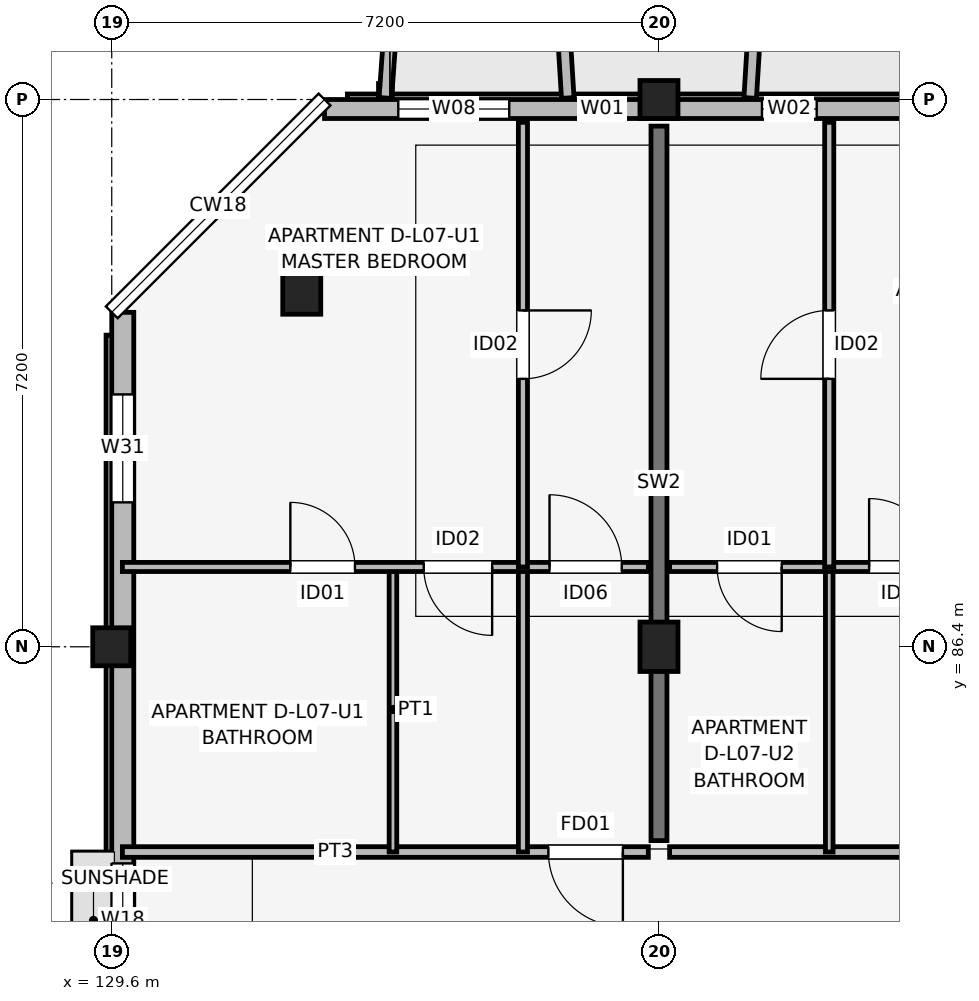
"""IFC4 building model, lengths in metres.
Left out: names, types, materials, properties, quantities, classifications, styles, units other than length and angle.
Written with IfcOpenShell. Run it as: python <this file> out.ifc"""

import sys

from ifc_helpers import new_model, si_unit, direction, frame, frame_2d, origin, origin_2d, place, context, subcontext, project, spatial, rectangle, extrude, element, fill, save


model = new_model("IFC4")
c1 = context("Model", 3, precision=1e-05, world=origin(), true_north=direction((0.0, 1.0)))
c2 = subcontext(c1, "Body", "Model", "MODEL_VIEW")
j1 = project(units=[si_unit("LENGTHUNIT", "METRE"), si_unit("PLANEANGLEUNIT", "RADIAN")], contexts=[c1])
p1 = place(None, origin())
s1 = spatial("IfcSite", under=j1, at=p1, CompositionType="ELEMENT")
p2 = place(p1, origin())
s2 = spatial("IfcBuilding", under=s1, at=p2, CompositionType="ELEMENT")
p3 = place(p2, frame((0.0, 0.0, 24.45)))
s3 = spatial("IfcBuildingStorey", under=s2, at=p3, CompositionType="ELEMENT", Elevation=24.45)
p4 = place(p3, frame((129.6, 86.4, 0.0), z_axis=(0.0, 0.0, 1.0), x_axis=(1.0, 0.0, 0.0)))
e1 = element("IfcColumn", 1, at=p4, inside=s3, PredefinedType="COLUMN", context=c2, shape_type="SweptSolid", body=[
    extrude(rectangle(XDim=0.5, YDim=0.5, at=origin_2d()), origin(), (0.0, 0.0, 1.0), 3.15),
])
for number, where, z_axis, x_axis in (
    (2, (132.1, 91.1, 0.0), (0.0, 0.0, 1.0), (1.0, 0.0, 0.0)),
    (3, (136.8, 86.4, 0.0), (0.0, 0.0, 1.0), (1.0, 0.0, 0.0)),
):
    element("IfcColumn", number, at=place(p3, frame(where, z_axis=z_axis, x_axis=x_axis)), inside=s3, PredefinedType="COLUMN", context=c2, shape_type="SweptSolid", body=[
        extrude(rectangle(XDim=0.5, YDim=0.65, at=origin_2d()), origin(), (0.0, 0.0, 1.0), 3.15),
    ])
p5 = place(p3, frame((136.8, 93.6, 0.0), z_axis=(0.0, 0.0, 1.0), x_axis=(1.0, 0.0, 0.0)))
e4 = element("IfcColumn", 4, at=p5, inside=s3, PredefinedType="COLUMN", context=c2, shape_type="SweptSolid", body=[
    extrude(rectangle(XDim=0.5, YDim=0.5, at=origin_2d()), origin(), (0.0, 0.0, 1.0), 3.15),
])
p6 = place(p3, frame((136.8, 83.85, 0.0), z_axis=(0.0, 0.0, 1.0), x_axis=(0.0, 1.0, 0.0)))
e5 = element("IfcWall", 5, at=p6, inside=s3, PredefinedType="SHEAR", context=c2, shape_type="SweptSolid", body=[
    extrude(rectangle(XDim=9.4, YDim=0.21, at=frame_2d((4.7, 0.0))), origin(), (0.0, 0.0, 1.0), 3.15),
])
p7 = place(p3, frame((162.8, 93.475, 0.0), z_axis=(0.0, 0.0, 1.0), x_axis=(-1.0, 0.0, 0.0)))
e6 = element("IfcWall", 6, at=p7, inside=s3, PredefinedType="SOLIDWALL", context=c2, shape_type="SweptSolid", body=[
    extrude(rectangle(XDim=30.4, YDim=0.25, at=frame_2d((15.2, 0.0))), origin(), (0.0, 0.0, 1.0), 2.43),
])
p8 = place(p7, frame((21.95, 0.0, 0.0), z_axis=(0.0, 0.0, 1.0), x_axis=(-1.0, 0.0, 0.0)))
e7 = element("IfcOpeningElement", 7, at=p8, cuts=e6, PredefinedType="OPENING", context=c2, shape_type="SweptSolid", body=[
    extrude(rectangle(XDim=1.5, YDim=2.15, at=frame_2d((0.75, 1.075))), frame((0.0, 0.135, 0.0), z_axis=(0.0, -1.0, 0.0), x_axis=(1.0, 0.0, 0.0)), (0.0, 0.0, 1.0), 0.27),
])
p9 = place(p7, frame((7.7, 0.0, 0.0), z_axis=(0.0, 0.0, 1.0), x_axis=(-1.0, 0.0, 0.0)))
e8 = element("IfcOpeningElement", 8, at=p9, cuts=e6, PredefinedType="OPENING", context=c2, shape_type="SweptSolid", body=[
    extrude(rectangle(XDim=1.8, YDim=2.15, at=frame_2d((0.9, 1.075))), frame((0.0, 0.135, 0.0), z_axis=(0.0, -1.0, 0.0), x_axis=(1.0, 0.0, 0.0)), (0.0, 0.0, 1.0), 0.27),
])
p10 = place(p7, frame((27.97, 0.0, 0.7)))
e9 = element("IfcOpeningElement", 9, at=p10, cuts=e6, PredefinedType="OPENING", context=c2, shape_type="SweptSolid", body=[
    extrude(rectangle(XDim=1.46, YDim=1.55, at=frame_2d((0.73, 0.775))), frame((0.0, 0.135, 0.0), z_axis=(0.0, -1.0, 0.0), x_axis=(1.0, 0.0, 0.0)), (0.0, 0.0, 1.0), 0.27),
])
p11 = place(p7, frame((26.445, 0.0, 0.75)))
e10 = element("IfcOpeningElement", 10, at=p11, cuts=e6, PredefinedType="OPENING", context=c2, shape_type="SweptSolid", body=[
    extrude(rectangle(XDim=0.6, YDim=1.25, at=frame_2d((0.3, 0.625))), frame((0.0, 0.135, 0.0), z_axis=(0.0, -1.0, 0.0), x_axis=(1.0, 0.0, 0.0)), (0.0, 0.0, 1.0), 0.27),
])
p12 = place(p7, frame((23.925, 0.0, 0.75)))
e11 = element("IfcOpeningElement", 11, at=p12, cuts=e6, PredefinedType="OPENING", context=c2, shape_type="SweptSolid", body=[
    extrude(rectangle(XDim=0.72, YDim=1.35, at=frame_2d((0.36, 0.675))), frame((0.0, 0.135, 0.0), z_axis=(0.0, -1.0, 0.0), x_axis=(1.0, 0.0, 0.0)), (0.0, 0.0, 1.0), 0.27),
])
p13 = place(p7, frame((16.725, 0.0, 0.75)))
e12 = element("IfcOpeningElement", 12, at=p13, cuts=e6, PredefinedType="OPENING", context=c2, shape_type="SweptSolid", body=[
    extrude(rectangle(XDim=0.72, YDim=1.35, at=frame_2d((0.36, 0.675))), frame((0.0, 0.135, 0.0), z_axis=(0.0, -1.0, 0.0), x_axis=(1.0, 0.0, 0.0)), (0.0, 0.0, 1.0), 0.27),
])
p14 = place(p7, frame((12.925, 0.0, 0.67)))
e13 = element("IfcOpeningElement", 13, at=p14, cuts=e6, PredefinedType="OPENING", context=c2, shape_type="SweptSolid", body=[
    extrude(rectangle(XDim=2.15, YDim=1.65, at=frame_2d((1.075, 0.825))), frame((0.0, 0.135, 0.0), z_axis=(0.0, -1.0, 0.0), x_axis=(1.0, 0.0, 0.0)), (0.0, 0.0, 1.0), 0.27),
])
p15 = place(p7, frame((3.355, 0.0, 0.75)))
e14 = element("IfcOpeningElement", 14, at=p15, cuts=e6, PredefinedType="OPENING", context=c2, shape_type="SweptSolid", body=[
    extrude(rectangle(XDim=0.6, YDim=1.25, at=frame_2d((0.3, 0.625))), frame((0.0, 0.135, 0.0), z_axis=(0.0, -1.0, 0.0), x_axis=(1.0, 0.0, 0.0)), (0.0, 0.0, 1.0), 0.27),
])
p16 = place(p7, frame((0.96, 0.0, 0.75)))
e15 = element("IfcOpeningElement", 15, at=p16, cuts=e6, PredefinedType="OPENING", context=c2, shape_type="SweptSolid", body=[
    extrude(rectangle(XDim=1.22, YDim=1.5, at=frame_2d((0.61, 0.75))), frame((0.0, 0.135, 0.0), z_axis=(0.0, -1.0, 0.0), x_axis=(1.0, 0.0, 0.0)), (0.0, 0.0, 1.0), 0.27),
])
p17 = place(p3, frame((129.745, 90.8, 0.0), z_axis=(0.0, 0.0, 1.0), x_axis=(0.0, -1.0, 0.0)))
e16 = element("IfcWall", 16, at=p17, inside=s3, PredefinedType="SOLIDWALL", context=c2, shape_type="SweptSolid", body=[
    extrude(rectangle(XDim=16.0, YDim=0.29, at=frame_2d((8.0, 0.0))), origin(), (0.0, 0.0, 1.0), 2.43),
])
p18 = place(p17, frame((7.25, 0.0, 1.05)))
e17 = element("IfcOpeningElement", 17, at=p18, cuts=e16, PredefinedType="OPENING", context=c2, shape_type="SweptSolid", body=[
    extrude(rectangle(XDim=1.5, YDim=1.15, at=frame_2d((0.75, 0.575))), frame((0.0, 0.155, 0.0), z_axis=(0.0, -1.0, 0.0), x_axis=(1.0, 0.0, 0.0)), (0.0, 0.0, 1.0), 0.31),
])
p19 = place(p17, frame((1.08, 0.0, 0.72)))
e18 = element("IfcOpeningElement", 18, at=p19, cuts=e16, PredefinedType="OPENING", context=c2, shape_type="SweptSolid", body=[
    extrude(rectangle(XDim=1.42, YDim=1.6, at=frame_2d((0.71, 0.8))), frame((0.0, 0.155, 0.0), z_axis=(0.0, -1.0, 0.0), x_axis=(1.0, 0.0, 0.0)), (0.0, 0.0, 1.0), 0.31),
])
p20 = place(p3, frame((133.2, 93.62, 0.0), z_axis=(0.0, 0.0, 1.0), x_axis=(0.071317687608, 0.997453651772, 0.0)))
e19 = element("IfcWall", 19, at=p20, inside=s3, PredefinedType="ELEMENTEDWALL", context=c2, shape_type="SweptSolid", body=[
    extrude(rectangle(XDim=1.965, YDim=0.165, at=frame_2d((0.982, 0.0))), origin(), (0.0, 0.0, 1.0), 2.95),
])
p21 = place(p3, frame((135.6, 93.62, 0.0), z_axis=(0.0, 0.0, 1.0), x_axis=(-0.061170732449, 0.998127317276, 0.0)))
e20 = element("IfcWall", 20, at=p21, inside=s3, PredefinedType="ELEMENTEDWALL", context=c2, shape_type="SweptSolid", body=[
    extrude(rectangle(XDim=1.964, YDim=0.165, at=frame_2d((0.982, 0.0))), origin(), (0.0, 0.0, 1.0), 2.95),
])
p22 = place(p3, frame((138.0, 93.62, 0.0), z_axis=(0.0, 0.0, 1.0), x_axis=(0.061170732449, 0.998127317276, 0.0)))
e21 = element("IfcWall", 21, at=p22, inside=s3, PredefinedType="ELEMENTEDWALL", context=c2, shape_type="SweptSolid", body=[
    extrude(rectangle(XDim=1.964, YDim=0.165, at=frame_2d((0.982, 0.0))), origin(), (0.0, 0.0, 1.0), 2.45),
])
p23 = place(p3, frame((129.74, 83.7, 0.0), z_axis=(0.0, 0.0, 1.0), x_axis=(1.0, 0.0, 0.0)))
e22 = element("IfcWall", 22, at=p23, inside=s3, PredefinedType="PARTITIONING", context=c2, shape_type="SweptSolid", body=[
    extrude(rectangle(XDim=6.92, YDim=0.14, at=frame_2d((3.46, 0.0))), origin(), (0.0, 0.0, 1.0), 2.38),
])
p24 = place(p23, frame((6.585, 0.0, 0.0), z_axis=(0.0, 0.0, 1.0), x_axis=(-1.0, 0.0, 0.0)))
e23 = element("IfcOpeningElement", 23, at=p24, cuts=e22, PredefinedType="OPENING", context=c2, shape_type="SweptSolid", body=[
    extrude(rectangle(XDim=0.98, YDim=2.1, at=frame_2d((0.49, 1.05))), frame((0.0, 0.08, 0.0), z_axis=(0.0, -1.0, 0.0), x_axis=(1.0, 0.0, 0.0)), (0.0, 0.0, 1.0), 0.16),
])
p25 = place(p3, frame((133.3, 83.7, 0.0), z_axis=(0.0, 0.0, 1.0), x_axis=(0.0, 1.0, 0.0)))
e24 = element("IfcWall", 24, at=p25, inside=s3, PredefinedType="PARTITIONING", context=c2, shape_type="SweptSolid", body=[
    extrude(rectangle(XDim=3.75, YDim=0.1, at=frame_2d((1.875, 0.0))), origin(), (0.0, 0.0, 1.0), 2.38),
])
p26 = place(p3, frame((135.01, 83.7, 0.0), z_axis=(0.0, 0.0, 1.0), x_axis=(0.0, 1.0, 0.0)))
e25 = element("IfcWall", 25, at=p26, inside=s3, PredefinedType="PARTITIONING", context=c2, shape_type="SweptSolid", body=[
    extrude(rectangle(XDim=3.75, YDim=0.12, at=frame_2d((1.875, 0.0))), origin(), (0.0, 0.0, 1.0), 2.38),
])
p27 = place(p3, frame((129.74, 87.45, 0.0), z_axis=(0.0, 0.0, 1.0), x_axis=(1.0, 0.0, 0.0)))
e26 = element("IfcWall", 26, at=p27, inside=s3, PredefinedType="PARTITIONING", context=c2, shape_type="SweptSolid", body=[
    extrude(rectangle(XDim=6.92, YDim=0.12, at=frame_2d((3.46, 0.0))), origin(), (0.0, 0.0, 1.0), 2.38),
])
p28 = place(p27, frame((2.21, 0.0, 0.0)))
e27 = element("IfcOpeningElement", 27, at=p28, cuts=e26, PredefinedType="OPENING", context=c2, shape_type="SweptSolid", body=[
    extrude(rectangle(XDim=0.85, YDim=2.08, at=frame_2d((0.425, 1.04))), frame((0.0, 0.07, 0.0), z_axis=(0.0, -1.0, 0.0), x_axis=(1.0, 0.0, 0.0)), (0.0, 0.0, 1.0), 0.14),
])
p29 = place(p27, frame((4.865, 0.0, 0.0), z_axis=(0.0, 0.0, 1.0), x_axis=(-1.0, 0.0, 0.0)))
e28 = element("IfcOpeningElement", 28, at=p29, cuts=e26, PredefinedType="OPENING", context=c2, shape_type="SweptSolid", body=[
    extrude(rectangle(XDim=0.9, YDim=2.08, at=frame_2d((0.45, 1.04))), frame((0.0, 0.07, 0.0), z_axis=(0.0, -1.0, 0.0), x_axis=(1.0, 0.0, 0.0)), (0.0, 0.0, 1.0), 0.14),
])
p30 = place(p27, frame((5.62, 0.0, 0.0)))
e29 = element("IfcOpeningElement", 29, at=p30, cuts=e26, PredefinedType="OPENING", context=c2, shape_type="SweptSolid", body=[
    extrude(rectangle(XDim=0.95, YDim=2.08, at=frame_2d((0.475, 1.04))), frame((0.0, 0.07, 0.0), z_axis=(0.0, -1.0, 0.0), x_axis=(1.0, 0.0, 0.0)), (0.0, 0.0, 1.0), 0.14),
])
p31 = place(p3, frame((135.01, 87.45, 0.0), z_axis=(0.0, 0.0, 1.0), x_axis=(0.0, 1.0, 0.0)))
e30 = element("IfcWall", 30, at=p31, inside=s3, PredefinedType="PARTITIONING", context=c2, shape_type="SweptSolid", body=[
    extrude(rectangle(XDim=5.85, YDim=0.12, at=frame_2d((2.925, 0.0))), origin(), (0.0, 0.0, 1.0), 2.38),
])
p32 = place(p31, frame((3.375, 0.0, 0.0), z_axis=(0.0, 0.0, 1.0), x_axis=(-1.0, 0.0, 0.0)))
e31 = element("IfcOpeningElement", 31, at=p32, cuts=e30, PredefinedType="OPENING", context=c2, shape_type="SweptSolid", body=[
    extrude(rectangle(XDim=0.9, YDim=2.08, at=frame_2d((0.45, 1.04))), frame((0.0, 0.07, 0.0), z_axis=(0.0, -1.0, 0.0), x_axis=(1.0, 0.0, 0.0)), (0.0, 0.0, 1.0), 0.14),
])
p33 = place(p3, frame((136.94, 83.7, 0.0), z_axis=(0.0, 0.0, 1.0), x_axis=(1.0, 0.0, 0.0)))
e32 = element("IfcWall", 32, at=p33, inside=s3, PredefinedType="PARTITIONING", context=c2, shape_type="SweptSolid", body=[
    extrude(rectangle(XDim=6.92, YDim=0.14, at=frame_2d((3.46, 0.0))), origin(), (0.0, 0.0, 1.0), 2.38),
])
p34 = place(p33, frame((4.995, 0.0, 0.0)))
e33 = element("IfcOpeningElement", 33, at=p34, cuts=e32, PredefinedType="OPENING", context=c2, shape_type="SweptSolid", body=[
    extrude(rectangle(XDim=0.98, YDim=2.1, at=frame_2d((0.49, 1.05))), frame((0.0, 0.08, 0.0), z_axis=(0.0, -1.0, 0.0), x_axis=(1.0, 0.0, 0.0)), (0.0, 0.0, 1.0), 0.16),
])
p35 = place(p3, frame((139.04, 83.7, 0.0), z_axis=(0.0, 0.0, 1.0), x_axis=(0.0, 1.0, 0.0)))
e34 = element("IfcWall", 34, at=p35, inside=s3, PredefinedType="PARTITIONING", context=c2, shape_type="SweptSolid", body=[
    extrude(rectangle(XDim=3.75, YDim=0.1, at=frame_2d((1.875, 0.0))), origin(), (0.0, 0.0, 1.0), 2.38),
])
p36 = place(p3, frame((136.94, 87.45, 0.0), z_axis=(0.0, 0.0, 1.0), x_axis=(1.0, 0.0, 0.0)))
e35 = element("IfcWall", 35, at=p36, inside=s3, PredefinedType="PARTITIONING", context=c2, shape_type="SweptSolid", body=[
    extrude(rectangle(XDim=6.92, YDim=0.12, at=frame_2d((3.46, 0.0))), origin(), (0.0, 0.0, 1.0), 2.38),
])
p37 = place(p36, frame((1.475, 0.0, 0.0), z_axis=(0.0, 0.0, 1.0), x_axis=(-1.0, 0.0, 0.0)))
e36 = element("IfcOpeningElement", 36, at=p37, cuts=e35, PredefinedType="OPENING", context=c2, shape_type="SweptSolid", body=[
    extrude(rectangle(XDim=0.85, YDim=2.08, at=frame_2d((0.425, 1.04))), frame((0.0, 0.07, 0.0), z_axis=(0.0, -1.0, 0.0), x_axis=(1.0, 0.0, 0.0)), (0.0, 0.0, 1.0), 0.14),
])
p38 = place(p36, frame((2.625, 0.0, 0.0)))
e37 = element("IfcOpeningElement", 37, at=p38, cuts=e35, PredefinedType="OPENING", context=c2, shape_type="SweptSolid", body=[
    extrude(rectangle(XDim=0.9, YDim=2.08, at=frame_2d((0.45, 1.04))), frame((0.0, 0.07, 0.0), z_axis=(0.0, -1.0, 0.0), x_axis=(1.0, 0.0, 0.0)), (0.0, 0.0, 1.0), 0.14),
])
p39 = place(p36, frame((5.96, 0.0, 0.0), z_axis=(0.0, 0.0, 1.0), x_axis=(-1.0, 0.0, 0.0)))
e38 = element("IfcOpeningElement", 38, at=p39, cuts=e35, PredefinedType="OPENING", context=c2, shape_type="SweptSolid", body=[
    extrude(rectangle(XDim=0.95, YDim=2.08, at=frame_2d((0.475, 1.04))), frame((0.0, 0.07, 0.0), z_axis=(0.0, -1.0, 0.0), x_axis=(1.0, 0.0, 0.0)), (0.0, 0.0, 1.0), 0.14),
])
p40 = place(p3, frame((139.04, 87.45, 0.0), z_axis=(0.0, 0.0, 1.0), x_axis=(0.0, 1.0, 0.0)))
e39 = element("IfcWall", 39, at=p40, inside=s3, PredefinedType="PARTITIONING", context=c2, shape_type="SweptSolid", body=[
    extrude(rectangle(XDim=5.85, YDim=0.12, at=frame_2d((2.925, 0.0))), origin(), (0.0, 0.0, 1.0), 2.38),
])
p41 = place(p40, frame((2.475, 0.0, 0.0)))
e40 = element("IfcOpeningElement", 40, at=p41, cuts=e39, PredefinedType="OPENING", context=c2, shape_type="SweptSolid", body=[
    extrude(rectangle(XDim=0.9, YDim=2.08, at=frame_2d((0.45, 1.04))), frame((0.0, 0.07, 0.0), z_axis=(0.0, -1.0, 0.0), x_axis=(1.0, 0.0, 0.0)), (0.0, 0.0, 1.0), 0.14),
])
p42 = place(p10, origin())
e41 = element("IfcWindow", 41, at=p42, inside=s3, PartitioningType="SINGLE_PANEL", PredefinedType="WINDOW", context=c2, shape_type="SweptSolid", body=[
    extrude(rectangle(XDim=1.46, YDim=1.55, at=frame_2d((0.73, 0.775))), frame((0.0, 0.03, 0.0), z_axis=(0.0, -1.0, 0.0), x_axis=(1.0, 0.0, 0.0)), (0.0, 0.0, 1.0), 0.06),
])
fill(e9, e41)
p43 = place(p11, origin())
e42 = element("IfcWindow", 42, at=p43, inside=s3, PartitioningType="SINGLE_PANEL", PredefinedType="WINDOW", context=c2, shape_type="SweptSolid", body=[
    extrude(rectangle(XDim=0.6, YDim=1.25, at=frame_2d((0.3, 0.625))), frame((0.0, 0.03, 0.0), z_axis=(0.0, -1.0, 0.0), x_axis=(1.0, 0.0, 0.0)), (0.0, 0.0, 1.0), 0.06),
])
fill(e10, e42)
p44 = place(p12, origin())
e43 = element("IfcWindow", 43, at=p44, inside=s3, PartitioningType="SINGLE_PANEL", PredefinedType="WINDOW", context=c2, shape_type="SweptSolid", body=[
    extrude(rectangle(XDim=0.72, YDim=1.35, at=frame_2d((0.36, 0.675))), frame((0.0, 0.03, 0.0), z_axis=(0.0, -1.0, 0.0), x_axis=(1.0, 0.0, 0.0)), (0.0, 0.0, 1.0), 0.06),
])
fill(e11, e43)
p45 = place(p18, origin())
e44 = element("IfcWindow", 44, at=p45, inside=s3, PartitioningType="SINGLE_PANEL", PredefinedType="WINDOW", context=c2, shape_type="SweptSolid", body=[
    extrude(rectangle(XDim=1.5, YDim=1.15, at=frame_2d((0.75, 0.575))), frame((0.0, 0.03, 0.0), z_axis=(0.0, -1.0, 0.0), x_axis=(1.0, 0.0, 0.0)), (0.0, 0.0, 1.0), 0.06),
])
fill(e17, e44)
p46 = place(p19, origin())
e45 = element("IfcWindow", 45, at=p46, inside=s3, PartitioningType="SINGLE_PANEL", PredefinedType="WINDOW", context=c2, shape_type="SweptSolid", body=[
    extrude(rectangle(XDim=1.42, YDim=1.6, at=frame_2d((0.71, 0.8))), frame((0.0, 0.03, 0.0), z_axis=(0.0, -1.0, 0.0), x_axis=(1.0, 0.0, 0.0)), (0.0, 0.0, 1.0), 0.06),
])
fill(e18, e45)
p47 = place(p24, origin())
e46 = element("IfcDoor", 46, at=p47, inside=s3, OperationType="SINGLE_SWING_RIGHT", PredefinedType="DOOR", context=c2, shape_type="SweptSolid", body=[
    extrude(rectangle(XDim=0.98, YDim=2.1, at=frame_2d((0.49, 1.05))), frame((0.0, 0.025, 0.0), z_axis=(0.0, -1.0, 0.0), x_axis=(1.0, 0.0, 0.0)), (0.0, 0.0, 1.0), 0.05),
])
fill(e23, e46)
p48 = place(p28, origin())
e47 = element("IfcDoor", 47, at=p48, inside=s3, OperationType="SINGLE_SWING_LEFT", PredefinedType="DOOR", context=c2, shape_type="SweptSolid", body=[
    extrude(rectangle(XDim=0.85, YDim=2.08, at=frame_2d((0.425, 1.04))), frame((0.0, 0.025, 0.0), z_axis=(0.0, -1.0, 0.0), x_axis=(1.0, 0.0, 0.0)), (0.0, 0.0, 1.0), 0.05),
])
fill(e27, e47)
p49 = place(p29, origin())
e48 = element("IfcDoor", 48, at=p49, inside=s3, OperationType="SINGLE_SWING_RIGHT", PredefinedType="DOOR", context=c2, shape_type="SweptSolid", body=[
    extrude(rectangle(XDim=0.9, YDim=2.08, at=frame_2d((0.45, 1.04))), frame((0.0, 0.025, 0.0), z_axis=(0.0, -1.0, 0.0), x_axis=(1.0, 0.0, 0.0)), (0.0, 0.0, 1.0), 0.05),
])
fill(e28, e48)
p50 = place(p30, origin())
e49 = element("IfcDoor", 49, at=p50, inside=s3, OperationType="SINGLE_SWING_LEFT", PredefinedType="DOOR", context=c2, shape_type="SweptSolid", body=[
    extrude(rectangle(XDim=0.95, YDim=2.08, at=frame_2d((0.475, 1.04))), frame((0.0, 0.025, 0.0), z_axis=(0.0, -1.0, 0.0), x_axis=(1.0, 0.0, 0.0)), (0.0, 0.0, 1.0), 0.05),
])
fill(e29, e49)
p51 = place(p32, origin())
e50 = element("IfcDoor", 50, at=p51, inside=s3, OperationType="SINGLE_SWING_RIGHT", PredefinedType="DOOR", context=c2, shape_type="SweptSolid", body=[
    extrude(rectangle(XDim=0.9, YDim=2.08, at=frame_2d((0.45, 1.04))), frame((0.0, 0.025, 0.0), z_axis=(0.0, -1.0, 0.0), x_axis=(1.0, 0.0, 0.0)), (0.0, 0.0, 1.0), 0.05),
])
fill(e31, e50)
p52 = place(p37, origin())
e51 = element("IfcDoor", 51, at=p52, inside=s3, OperationType="SINGLE_SWING_RIGHT", PredefinedType="DOOR", context=c2, shape_type="SweptSolid", body=[
    extrude(rectangle(XDim=0.85, YDim=2.08, at=frame_2d((0.425, 1.04))), frame((0.0, 0.025, 0.0), z_axis=(0.0, -1.0, 0.0), x_axis=(1.0, 0.0, 0.0)), (0.0, 0.0, 1.0), 0.05),
])
fill(e36, e51)
p53 = place(p38, origin())
e52 = element("IfcDoor", 52, at=p53, inside=s3, OperationType="SINGLE_SWING_LEFT", PredefinedType="DOOR", context=c2, shape_type="SweptSolid", body=[
    extrude(rectangle(XDim=0.9, YDim=2.08, at=frame_2d((0.45, 1.04))), frame((0.0, 0.025, 0.0), z_axis=(0.0, -1.0, 0.0), x_axis=(1.0, 0.0, 0.0)), (0.0, 0.0, 1.0), 0.05),
])
fill(e37, e52)
p54 = place(p41, origin())
e53 = element("IfcDoor", 53, at=p54, inside=s3, OperationType="SINGLE_SWING_LEFT", PredefinedType="DOOR", context=c2, shape_type="SweptSolid", body=[
    extrude(rectangle(XDim=0.9, YDim=2.08, at=frame_2d((0.45, 1.04))), frame((0.0, 0.025, 0.0), z_axis=(0.0, -1.0, 0.0), x_axis=(1.0, 0.0, 0.0)), (0.0, 0.0, 1.0), 0.05),
])
fill(e40, e53)
save(model, sys.argv[1])
